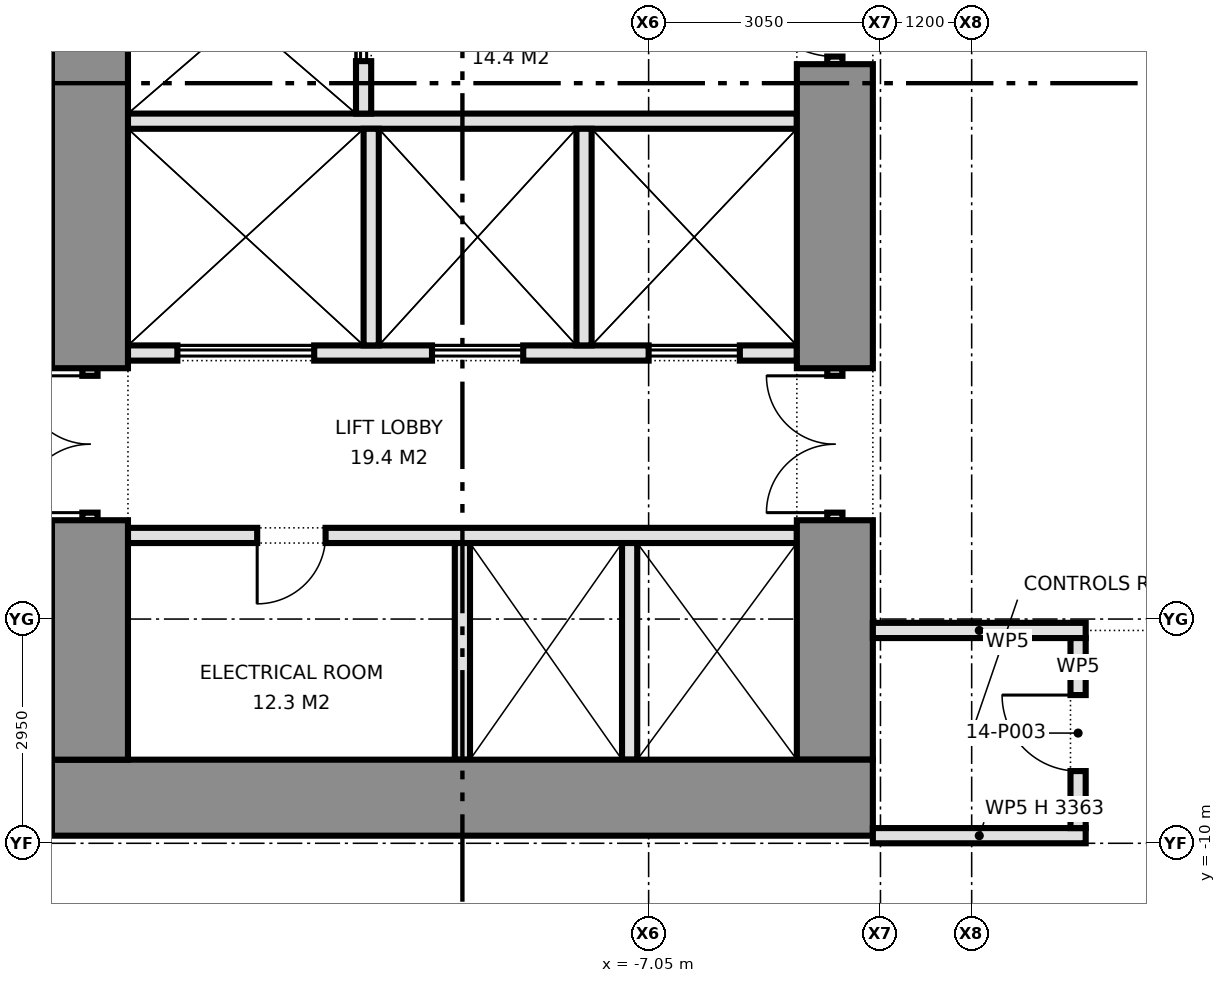
"""IFC4 building model, lengths in metres.
Left out: names, types, materials, properties, quantities, classifications, styles, units other than length and angle.
Written with IfcOpenShell. Run it as: python <this file> out.ifc"""

import sys

from ifc_helpers import new_model, si_unit, direction, frame, frame_2d, origin, place, context, subcontext, project, spatial, rectangle, extrude, element, fill, save


model = new_model("IFC4")
c1 = context("Model", 3, precision=1e-05, world=origin(), true_north=direction((0.0, 1.0)))
c2 = subcontext(c1, "Body", "Model", "MODEL_VIEW")
j1 = project(units=[si_unit("LENGTHUNIT", "METRE"), si_unit("PLANEANGLEUNIT", "RADIAN")], contexts=[c1])
p1 = place(None, origin())
s1 = spatial("IfcSite", under=j1, at=p1, CompositionType="ELEMENT")
p2 = place(p1, origin())
s2 = spatial("IfcBuilding", under=s1, at=p2, CompositionType="ELEMENT")
p3 = place(p2, frame((0.0, 0.0, 64.1)))
s3 = spatial("IfcBuildingStorey", under=s2, at=p3, CompositionType="ELEMENT", Elevation=64.1)
p4 = place(p3, frame((-14.9, -9.4, 0.0), z_axis=(0.0, 0.0, 1.0), x_axis=(1.0, 0.0, 0.0)))
e1 = element("IfcWall", 1, at=p4, inside=s3, PredefinedType="SHEAR", context=c2, shape_type="SweptSolid", body=[
    extrude(rectangle(XDim=10.8, YDim=1.0, at=frame_2d((5.4, 0.0))), origin(), (0.0, 0.0, 1.0), 4.3),
])
p5 = place(p3, frame((-14.4, -8.9, 0.0), z_axis=(0.0, 0.0, 1.0), x_axis=(0.0, 1.0, 0.0)))
e2 = element("IfcWall", 2, at=p5, inside=s3, PredefinedType="SHEAR", context=c2, shape_type="SweptSolid", body=[
    extrude(rectangle(XDim=3.15, YDim=1.0, at=frame_2d((1.575, 0.0))), origin(), (0.0, 0.0, 1.0), 4.3),
])
p6 = place(p3, frame((-14.4, -5.75, 0.0), z_axis=(0.0, 0.0, 1.0), x_axis=(0.0, 1.0, 0.0)))
e3 = element("IfcWall", 3, at=p6, inside=s3, PredefinedType="PARTITIONING", context=c2, shape_type="SweptSolid", body=[
    extrude(rectangle(XDim=2.0, YDim=0.2, at=frame_2d((1.0, 0.0))), origin(), (0.0, 0.0, 1.0), 2.4),
])
p7 = place(p6, frame((0.1, 0.0, 0.0)))
e4 = element("IfcOpeningElement", 4, at=p7, cuts=e3, PredefinedType="OPENING", context=c2, shape_type="SweptSolid", body=[
    extrude(rectangle(XDim=1.8, YDim=2.1, at=frame_2d((0.9, 1.05))), frame((0.0, 0.11, 0.0), z_axis=(0.0, -1.0, 0.0), x_axis=(1.0, 0.0, 0.0)), (0.0, 0.0, 1.0), 0.22),
])
p8 = place(p3, frame((-14.4, -3.75, 0.0), z_axis=(0.0, 0.0, 1.0), x_axis=(0.0, 1.0, 0.0)))
e5 = element("IfcWall", 5, at=p8, inside=s3, PredefinedType="SHEAR", context=c2, shape_type="SweptSolid", body=[
    extrude(rectangle(XDim=6.13, YDim=1.0, at=frame_2d((3.065, 0.0))), origin(), (0.0, 0.0, 1.0), 4.3),
])
p9 = place(p3, frame((-4.6, -8.9, 0.0), z_axis=(0.0, 0.0, 1.0), x_axis=(0.0, 1.0, 0.0)))
e6 = element("IfcWall", 6, at=p9, inside=s3, PredefinedType="SHEAR", context=c2, shape_type="SweptSolid", body=[
    extrude(rectangle(XDim=3.15, YDim=1.0, at=frame_2d((1.575, 0.0))), origin(), (0.0, 0.0, 1.0), 4.3),
])
p10 = place(p3, frame((-4.6, -5.75, 0.0), z_axis=(0.0, 0.0, 1.0), x_axis=(0.0, 1.0, 0.0)))
e7 = element("IfcWall", 7, at=p10, inside=s3, PredefinedType="PARTITIONING", context=c2, shape_type="SweptSolid", body=[
    extrude(rectangle(XDim=2.0, YDim=0.2, at=frame_2d((1.0, 0.0))), origin(), (0.0, 0.0, 1.0), 2.4),
])
p11 = place(p10, frame((0.1, 0.0, 0.0)))
e8 = element("IfcOpeningElement", 8, at=p11, cuts=e7, PredefinedType="OPENING", context=c2, shape_type="SweptSolid", body=[
    extrude(rectangle(XDim=1.8, YDim=2.1, at=frame_2d((0.9, 1.05))), frame((0.0, 0.11, 0.0), z_axis=(0.0, -1.0, 0.0), x_axis=(1.0, 0.0, 0.0)), (0.0, 0.0, 1.0), 0.22),
])
p12 = place(p3, frame((-4.6, -3.75, 0.0), z_axis=(0.0, 0.0, 1.0), x_axis=(0.0, 1.0, 0.0)))
e9 = element("IfcWall", 9, at=p12, inside=s3, PredefinedType="SHEAR", context=c2, shape_type="SweptSolid", body=[
    extrude(rectangle(XDim=4.0, YDim=1.0, at=frame_2d((2.0, 0.0))), origin(), (0.0, 0.0, 1.0), 4.3),
])
p13 = place(p3, frame((-4.6, 0.25, 0.0), z_axis=(0.0, 0.0, 1.0), x_axis=(0.0, 1.0, 0.0)))
e10 = element("IfcWall", 10, at=p13, inside=s3, PredefinedType="PARTITIONING", context=c2, shape_type="SweptSolid", body=[
    extrude(rectangle(XDim=1.3, YDim=0.2, at=frame_2d((0.65, 0.0))), origin(), (0.0, 0.0, 1.0), 2.4),
])
p14 = place(p13, frame((0.1, 0.0, 0.0)))
e11 = element("IfcOpeningElement", 11, at=p14, cuts=e10, PredefinedType="OPENING", context=c2, shape_type="SweptSolid", body=[
    extrude(rectangle(XDim=1.1, YDim=2.1, at=frame_2d((0.55, 1.05))), frame((0.0, 0.11, 0.0), z_axis=(0.0, -1.0, 0.0), x_axis=(1.0, 0.0, 0.0)), (0.0, 0.0, 1.0), 0.22),
])
p15 = place(p3, frame((-13.9, -5.95, 0.0), z_axis=(0.0, 0.0, 1.0), x_axis=(1.0, 0.0, 0.0)))
e12 = element("IfcWall", 12, at=p15, inside=s3, PredefinedType="PARTITIONING", context=c2, shape_type="SweptSolid", body=[
    extrude(rectangle(XDim=8.8, YDim=0.2, at=frame_2d((4.4, 0.0))), origin(), (0.0, 0.0, 1.0), 4.3),
])
p16 = place(p15, frame((1.7, 0.0, 0.0)))
e13 = element("IfcOpeningElement", 13, at=p16, cuts=e12, PredefinedType="OPENING", context=c2, shape_type="SweptSolid", body=[
    extrude(rectangle(XDim=0.9, YDim=2.1, at=frame_2d((0.45, 1.05))), frame((0.0, 0.11, 0.0), z_axis=(0.0, -1.0, 0.0), x_axis=(1.0, 0.0, 0.0)), (0.0, 0.0, 1.0), 0.22),
])
p17 = place(p3, frame((-13.9, -3.55, 0.0), z_axis=(0.0, 0.0, 1.0), x_axis=(1.0, 0.0, 0.0)))
e14 = element("IfcWall", 14, at=p17, inside=s3, PredefinedType="PARTITIONING", context=c2, shape_type="SweptSolid", body=[
    extrude(rectangle(XDim=8.8, YDim=0.2, at=frame_2d((4.4, 0.0))), origin(), (0.0, 0.0, 1.0), 4.3),
])
p18 = place(p17, frame((0.65, 0.0, 0.0)))
e15 = element("IfcOpeningElement", 15, at=p18, cuts=e14, PredefinedType="OPENING", context=c2, shape_type="SweptSolid", body=[
    extrude(rectangle(XDim=1.8, YDim=2.1, at=frame_2d((0.9, 1.05))), frame((0.0, 0.11, 0.0), z_axis=(0.0, -1.0, 0.0), x_axis=(1.0, 0.0, 0.0)), (0.0, 0.0, 1.0), 0.22),
])
p19 = place(p17, frame((4.0, 0.0, 0.0)))
e16 = element("IfcOpeningElement", 16, at=p19, cuts=e14, PredefinedType="OPENING", context=c2, shape_type="SweptSolid", body=[
    extrude(rectangle(XDim=1.2, YDim=2.1, at=frame_2d((0.6, 1.05))), frame((0.0, 0.11, 0.0), z_axis=(0.0, -1.0, 0.0), x_axis=(1.0, 0.0, 0.0)), (0.0, 0.0, 1.0), 0.22),
])
p20 = place(p17, frame((6.85, 0.0, 0.0)))
e17 = element("IfcOpeningElement", 17, at=p20, cuts=e14, PredefinedType="OPENING", context=c2, shape_type="SweptSolid", body=[
    extrude(rectangle(XDim=1.2, YDim=2.1, at=frame_2d((0.6, 1.05))), frame((0.0, 0.11, 0.0), z_axis=(0.0, -1.0, 0.0), x_axis=(1.0, 0.0, 0.0)), (0.0, 0.0, 1.0), 0.22),
])
p21 = place(p3, frame((-13.9, -0.5, 0.0), z_axis=(0.0, 0.0, 1.0), x_axis=(1.0, 0.0, 0.0)))
e18 = element("IfcWall", 18, at=p21, inside=s3, PredefinedType="PARTITIONING", context=c2, shape_type="SweptSolid", body=[
    extrude(rectangle(XDim=8.8, YDim=0.2, at=frame_2d((4.4, 0.0))), origin(), (0.0, 0.0, 1.0), 4.3),
])
p22 = place(p3, frame((-10.8, -0.4, 0.0), z_axis=(0.0, 0.0, 1.0), x_axis=(0.0, 1.0, 0.0)))
e19 = element("IfcWall", 19, at=p22, inside=s3, PredefinedType="PARTITIONING", context=c2, shape_type="SweptSolid", body=[
    extrude(rectangle(XDim=2.58, YDim=0.2, at=frame_2d((1.29, 0.0))), origin(), (0.0, 0.0, 1.0), 4.3),
])
p23 = place(p22, frame((0.69, 0.0, 0.0)))
e20 = element("IfcOpeningElement", 20, at=p23, cuts=e19, PredefinedType="OPENING", context=c2, shape_type="SweptSolid", body=[
    extrude(rectangle(XDim=1.2, YDim=2.1, at=frame_2d((0.6, 1.05))), frame((0.0, 0.11, 0.0), z_axis=(0.0, -1.0, 0.0), x_axis=(1.0, 0.0, 0.0)), (0.0, 0.0, 1.0), 0.22),
])
for number, where, z_axis, x_axis in (
    (21, (-9.5, -8.9, 0.0), (0.0, 0.0, 1.0), (0.0, 1.0, 0.0)),
    (22, (-7.3, -8.9, 0.0), (0.0, 0.0, 1.0), (0.0, 1.0, 0.0)),
    (23, (-10.7, -3.45, 0.0), (0.0, 0.0, 1.0), (0.0, 1.0, 0.0)),
    (24, (-7.9, -3.45, 0.0), (0.0, 0.0, 1.0), (0.0, 1.0, 0.0)),
):
    element("IfcWall", number, at=place(p3, frame(where, z_axis=z_axis, x_axis=x_axis)), inside=s3, PredefinedType="PARTITIONING", context=c2, shape_type="SweptSolid", body=[
        extrude(rectangle(XDim=2.85, YDim=0.2, at=frame_2d((1.425, 0.0))), origin(), (0.0, 0.0, 1.0), 4.3),
    ])
p24 = place(p3, frame((-4.1, -9.9, 0.0), z_axis=(0.0, 0.0, 1.0), x_axis=(1.0, 0.0, 0.0)))
e25 = element("IfcWall", 25, at=p24, inside=s3, PredefinedType="PARTITIONING", context=c2, shape_type="SweptSolid", body=[
    extrude(rectangle(XDim=2.8, YDim=0.2, at=frame_2d((1.4, 0.0))), origin(), (0.0, 0.0, 1.0), 3.363),
])
p25 = place(p3, frame((-4.1, -7.2, 0.0), z_axis=(0.0, 0.0, 1.0), x_axis=(1.0, 0.0, 0.0)))
e26 = element("IfcWall", 26, at=p25, inside=s3, PredefinedType="PARTITIONING", context=c2, shape_type="SweptSolid", body=[
    extrude(rectangle(XDim=2.8, YDim=0.2, at=frame_2d((1.4, 0.0))), origin(), (0.0, 0.0, 1.0), 4.3),
])
p26 = place(p3, frame((-1.4, -9.8, 0.0), z_axis=(0.0, 0.0, 1.0), x_axis=(0.0, 1.0, 0.0)))
e27 = element("IfcWall", 27, at=p26, inside=s3, PredefinedType="PARTITIONING", context=c2, shape_type="SweptSolid", body=[
    extrude(rectangle(XDim=2.5, YDim=0.2, at=frame_2d((1.25, 0.0))), origin(), (0.0, 0.0, 1.0), 4.3),
])
p27 = place(p26, frame((0.75, 0.0, 0.0)))
e28 = element("IfcOpeningElement", 28, at=p27, cuts=e27, PredefinedType="OPENING", context=c2, shape_type="SweptSolid", body=[
    extrude(rectangle(XDim=1.0, YDim=2.1, at=frame_2d((0.5, 1.05))), frame((0.0, 0.11, 0.0), z_axis=(0.0, -1.0, 0.0), x_axis=(1.0, 0.0, 0.0)), (0.0, 0.0, 1.0), 0.22),
])
p28 = place(p7, origin())
e29 = element("IfcDoor", 29, at=p28, inside=s3, OperationType="DOUBLE_DOOR_SINGLE_SWING", PredefinedType="DOOR", context=c2, shape_type="SweptSolid", body=[
    extrude(rectangle(XDim=1.8, YDim=2.1, at=frame_2d((0.9, 1.05))), frame((0.0, 0.025, 0.0), z_axis=(0.0, -1.0, 0.0), x_axis=(1.0, 0.0, 0.0)), (0.0, 0.0, 1.0), 0.05),
])
fill(e4, e29)
p29 = place(p11, origin())
e30 = element("IfcDoor", 30, at=p29, inside=s3, OperationType="DOUBLE_DOOR_SINGLE_SWING", PredefinedType="DOOR", context=c2, shape_type="SweptSolid", body=[
    extrude(rectangle(XDim=1.8, YDim=2.1, at=frame_2d((0.9, 1.05))), frame((0.0, 0.025, 0.0), z_axis=(0.0, -1.0, 0.0), x_axis=(1.0, 0.0, 0.0)), (0.0, 0.0, 1.0), 0.05),
])
fill(e8, e30)
p30 = place(p14, origin())
e31 = element("IfcDoor", 31, at=p30, inside=s3, OperationType="SINGLE_SWING_RIGHT", PredefinedType="DOOR", context=c2, shape_type="SweptSolid", body=[
    extrude(rectangle(XDim=1.1, YDim=2.1, at=frame_2d((0.55, 1.05))), frame((0.0, 0.025, 0.0), z_axis=(0.0, -1.0, 0.0), x_axis=(1.0, 0.0, 0.0)), (0.0, 0.0, 1.0), 0.05),
])
fill(e11, e31)
p31 = place(p18, origin())
e32 = element("IfcDoor", 32, at=p31, inside=s3, OperationType="DOUBLE_DOOR_SLIDING", PredefinedType="DOOR", context=c2, shape_type="SweptSolid", body=[
    extrude(rectangle(XDim=1.8, YDim=2.1, at=frame_2d((0.9, 1.05))), frame((0.0, 0.025, 0.0), z_axis=(0.0, -1.0, 0.0), x_axis=(1.0, 0.0, 0.0)), (0.0, 0.0, 1.0), 0.05),
])
fill(e15, e32)
p32 = place(p19, origin())
e33 = element("IfcDoor", 33, at=p32, inside=s3, OperationType="DOUBLE_DOOR_SLIDING", PredefinedType="DOOR", context=c2, shape_type="SweptSolid", body=[
    extrude(rectangle(XDim=1.2, YDim=2.1, at=frame_2d((0.6, 1.05))), frame((0.0, 0.025, 0.0), z_axis=(0.0, -1.0, 0.0), x_axis=(1.0, 0.0, 0.0)), (0.0, 0.0, 1.0), 0.05),
])
fill(e16, e33)
p33 = place(p20, origin())
e34 = element("IfcDoor", 34, at=p33, inside=s3, OperationType="DOUBLE_DOOR_SLIDING", PredefinedType="DOOR", context=c2, shape_type="SweptSolid", body=[
    extrude(rectangle(XDim=1.2, YDim=2.1, at=frame_2d((0.6, 1.05))), frame((0.0, 0.025, 0.0), z_axis=(0.0, -1.0, 0.0), x_axis=(1.0, 0.0, 0.0)), (0.0, 0.0, 1.0), 0.05),
])
fill(e17, e34)
p34 = place(p23, origin())
e35 = element("IfcDoor", 35, at=p34, inside=s3, OperationType="DOUBLE_DOOR_SLIDING", PredefinedType="DOOR", context=c2, shape_type="SweptSolid", body=[
    extrude(rectangle(XDim=1.2, YDim=2.1, at=frame_2d((0.6, 1.05))), frame((0.0, 0.025, 0.0), z_axis=(0.0, -1.0, 0.0), x_axis=(1.0, 0.0, 0.0)), (0.0, 0.0, 1.0), 0.05),
])
fill(e20, e35)
p35 = place(p16, frame((0.9, 0.0, 0.0), z_axis=(0.0, 0.0, 1.0), x_axis=(-1.0, 0.0, 0.0)))
e36 = element("IfcDoor", 36, at=p35, inside=s3, OperationType="SINGLE_SWING_RIGHT", PredefinedType="DOOR", context=c2, shape_type="SweptSolid", body=[
    extrude(rectangle(XDim=0.9, YDim=2.1, at=frame_2d((0.45, 1.05))), frame((0.0, 0.025, 0.0), z_axis=(0.0, -1.0, 0.0), x_axis=(1.0, 0.0, 0.0)), (0.0, 0.0, 1.0), 0.05),
])
fill(e13, e36)
p36 = place(p27, origin())
e37 = element("IfcDoor", 37, at=p36, inside=s3, OperationType="SINGLE_SWING_RIGHT", PredefinedType="DOOR", context=c2, shape_type="SweptSolid", body=[
    extrude(rectangle(XDim=1.0, YDim=2.1, at=frame_2d((0.5, 1.05))), frame((0.0, 0.025, 0.0), z_axis=(0.0, -1.0, 0.0), x_axis=(1.0, 0.0, 0.0)), (0.0, 0.0, 1.0), 0.05),
])
fill(e28, e37)
save(model, sys.argv[1])
